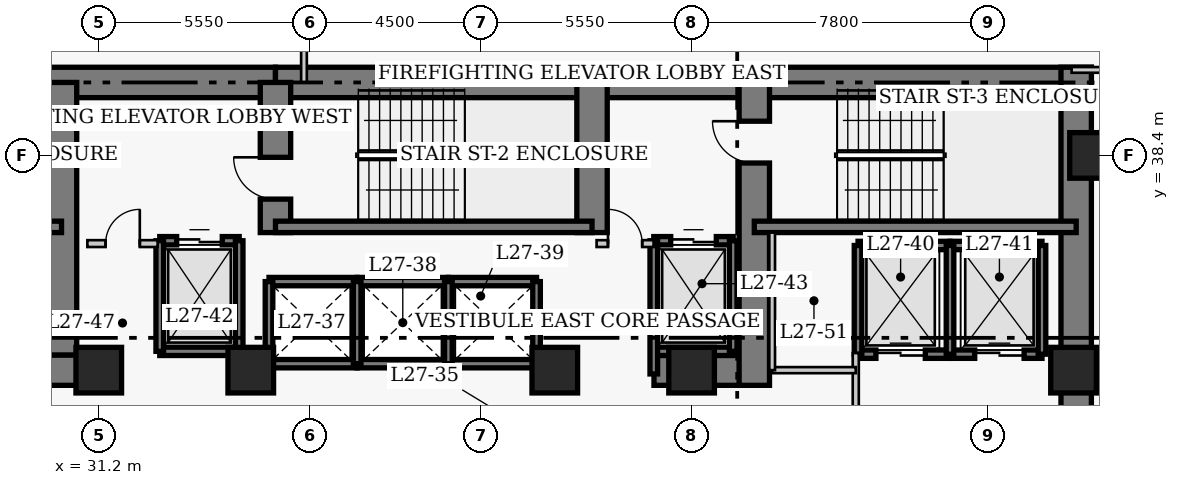
"""IFC4 building model, lengths in metres.
Left out: names, types, materials, properties, quantities, classifications, styles, units other than length and angle.
Written with IfcOpenShell. Run it as: python <this file> out.ifc"""

import sys

from ifc_helpers import new_model, si_unit, direction, frame, frame_2d, origin, origin_2d, place, context, subcontext, project, spatial, rectangle, extrude, element, fill, save


model = new_model("IFC4")
c1 = context("Model", 3, precision=1e-05, world=origin(), true_north=direction((0.0, 1.0)))
c2 = subcontext(c1, "Body", "Model", "MODEL_VIEW")
j1 = project(units=[si_unit("LENGTHUNIT", "METRE"), si_unit("PLANEANGLEUNIT", "RADIAN")], contexts=[c1])
p1 = place(None, origin())
s1 = spatial("IfcSite", under=j1, at=p1, CompositionType="ELEMENT")
p2 = place(p1, origin())
s2 = spatial("IfcBuilding", under=s1, at=p2, CompositionType="ELEMENT")
p3 = place(p2, frame((0.0, 0.0, 110.8)))
s3 = spatial("IfcBuildingStorey", under=s2, at=p3, CompositionType="ELEMENT", Elevation=110.8)
p4 = place(p3, frame((21.5, 40.32, 0.0), z_axis=(0.0, 0.0, 1.0), x_axis=(1.0, 0.0, 0.0)))
e1 = element("IfcWall", 1, at=p4, inside=s3, PredefinedType="SHEAR", context=c2, shape_type="SweptSolid", body=[
    extrude(rectangle(XDim=14.35, YDim=0.8, at=frame_2d((7.175, 0.0))), origin(), (0.0, 0.0, 1.0), 3.8),
])
p5 = place(p3, frame((35.85, 40.32, 0.0), z_axis=(0.0, 0.0, 1.0), x_axis=(1.0, 0.0, 0.0)))
e2 = element("IfcWall", 2, at=p5, inside=s3, PredefinedType="SHEAR", context=c2, shape_type="SweptSolid", body=[
    extrude(rectangle(XDim=12.6, YDim=0.8, at=frame_2d((6.3, 0.0))), origin(), (0.0, 0.0, 1.0), 3.8),
])
p6 = place(p3, frame((48.45, 40.32, 0.0), z_axis=(0.0, 0.0, 1.0), x_axis=(1.0, 0.0, 0.0)))
e3 = element("IfcWall", 3, at=p6, inside=s3, PredefinedType="SHEAR", context=c2, shape_type="SweptSolid", body=[
    extrude(rectangle(XDim=8.87, YDim=0.8, at=frame_2d((4.435, 0.0))), origin(), (0.0, 0.0, 1.0), 3.8),
])
p7 = place(p3, frame((56.92, 27.05, 0.0), z_axis=(0.0, 0.0, 1.0), x_axis=(0.0, 1.0, 0.0)))
e4 = element("IfcWall", 4, at=p7, inside=s3, PredefinedType="SHEAR", context=c2, shape_type="SweptSolid", body=[
    extrude(rectangle(XDim=13.67, YDim=0.8, at=frame_2d((6.835, 0.0))), origin(), (0.0, 0.0, 1.0), 3.8),
])
p8 = place(p3, frame((28.45, 32.75, 0.0), z_axis=(0.0, 0.0, 1.0), x_axis=(1.0, 0.0, 0.0)))
e5 = element("IfcWall", 5, at=p8, inside=s3, PredefinedType="SHEAR", context=c2, shape_type="SweptSolid", body=[
    extrude(rectangle(XDim=2.4, YDim=0.8, at=frame_2d((1.2, 0.0))), origin(), (0.0, 0.0, 1.0), 3.8),
])
p9 = place(p3, frame((45.81, 32.75, 0.0), z_axis=(0.0, 0.0, 1.0), x_axis=(1.0, 0.0, 0.0)))
e6 = element("IfcWall", 6, at=p9, inside=s3, PredefinedType="SHEAR", context=c2, shape_type="SweptSolid", body=[
    extrude(rectangle(XDim=2.64, YDim=0.8, at=frame_2d((1.32, 0.0))), origin(), (0.0, 0.0, 1.0), 3.8),
])
p10 = place(p3, frame((30.22, 33.15, 0.0), z_axis=(0.0, 0.0, 1.0), x_axis=(0.0, 1.0, 0.0)))
e7 = element("IfcWall", 7, at=p10, inside=s3, PredefinedType="SHEAR", context=c2, shape_type="SweptSolid", body=[
    extrude(rectangle(XDim=7.17, YDim=0.8, at=frame_2d((3.585, 0.0))), origin(), (0.0, 0.0, 1.0), 3.8),
])
p11 = place(p3, frame((35.85, 36.37, 0.0), z_axis=(0.0, 0.0, 1.0), x_axis=(0.0, 1.0, 0.0)))
e8 = element("IfcWall", 8, at=p11, inside=s3, PredefinedType="SHEAR", context=c2, shape_type="SweptSolid", body=[
    extrude(rectangle(XDim=3.95, YDim=0.8, at=frame_2d((1.975, 0.0))), origin(), (0.0, 0.0, 1.0), 3.8),
])
p12 = place(p11, frame((0.88, 0.0, 0.0)))
e9 = element("IfcOpeningElement", 9, at=p12, cuts=e8, PredefinedType="OPENING", context=c2, shape_type="SweptSolid", body=[
    extrude(rectangle(XDim=1.1, YDim=2.15, at=frame_2d((0.55, 1.075))), frame((0.0, 0.41, 0.0), z_axis=(0.0, -1.0, 0.0), x_axis=(1.0, 0.0, 0.0)), (0.0, 0.0, 1.0), 0.82),
])
p13 = place(p3, frame((44.18, 36.37, 0.0), z_axis=(0.0, 0.0, 1.0), x_axis=(0.0, 1.0, 0.0)))
e10 = element("IfcWall", 10, at=p13, inside=s3, PredefinedType="SHEAR", context=c2, shape_type="SweptSolid", body=[
    extrude(rectangle(XDim=3.95, YDim=0.8, at=frame_2d((1.975, 0.0))), origin(), (0.0, 0.0, 1.0), 3.8),
])
p14 = place(p3, frame((48.45, 32.35, 0.0), z_axis=(0.0, 0.0, 1.0), x_axis=(0.0, 1.0, 0.0)))
e11 = element("IfcWall", 11, at=p14, inside=s3, PredefinedType="SHEAR", context=c2, shape_type="SweptSolid", body=[
    extrude(rectangle(XDim=7.97, YDim=0.8, at=frame_2d((3.985, 0.0))), origin(), (0.0, 0.0, 1.0), 3.8),
])
p15 = place(p14, frame((5.85, 0.0, 0.0)))
e12 = element("IfcOpeningElement", 12, at=p15, cuts=e11, PredefinedType="OPENING", context=c2, shape_type="SweptSolid", body=[
    extrude(rectangle(XDim=1.1, YDim=2.15, at=frame_2d((0.55, 1.075))), frame((0.0, 0.41, 0.0), z_axis=(0.0, -1.0, 0.0), x_axis=(1.0, 0.0, 0.0)), (0.0, 0.0, 1.0), 0.82),
])
p16 = place(p3, frame((21.9, 36.52, 0.0), z_axis=(0.0, 0.0, 1.0), x_axis=(1.0, 0.0, 0.0)))
e13 = element("IfcWall", 13, at=p16, inside=s3, PredefinedType="SHEAR", context=c2, shape_type="SweptSolid", body=[
    extrude(rectangle(XDim=8.32, YDim=0.3, at=frame_2d((4.16, 0.0))), origin(), (0.0, 0.0, 1.0), 3.8),
])
p17 = place(p16, frame((0.9, 0.0, 0.0)))
e14 = element("IfcOpeningElement", 14, at=p17, cuts=e13, PredefinedType="OPENING", context=c2, shape_type="SweptSolid", body=[
    extrude(rectangle(XDim=1.1, YDim=2.15, at=frame_2d((0.55, 1.075))), frame((0.0, 0.16, 0.0), z_axis=(0.0, -1.0, 0.0), x_axis=(1.0, 0.0, 0.0)), (0.0, 0.0, 1.0), 0.32),
])
p18 = place(p3, frame((35.85, 36.52, 0.0), z_axis=(0.0, 0.0, 1.0), x_axis=(1.0, 0.0, 0.0)))
e15 = element("IfcWall", 15, at=p18, inside=s3, PredefinedType="SHEAR", context=c2, shape_type="SweptSolid", body=[
    extrude(rectangle(XDim=8.33, YDim=0.3, at=frame_2d((4.165, 0.0))), origin(), (0.0, 0.0, 1.0), 3.8),
])
p19 = place(p3, frame((48.45, 36.52, 0.0), z_axis=(0.0, 0.0, 1.0), x_axis=(1.0, 0.0, 0.0)))
e16 = element("IfcWall", 16, at=p19, inside=s3, PredefinedType="SHEAR", context=c2, shape_type="SweptSolid", body=[
    extrude(rectangle(XDim=8.47, YDim=0.3, at=frame_2d((4.235, 0.0))), origin(), (0.0, 0.0, 1.0), 3.8),
])
for number, where, z_axis, x_axis in (
    (17, (57.35, 38.4, 0.0), (0.0, 0.0, 1.0), (1.0, 0.0, 0.0)),
    (18, (31.2, 32.75, 0.0), (0.0, 0.0, 1.0), (1.0, 0.0, 0.0)),
    (19, (35.2, 32.75, 0.0), (0.0, 0.0, 1.0), (1.0, 0.0, 0.0)),
    (20, (43.2, 32.75, 0.0), (0.0, 0.0, 1.0), (1.0, 0.0, 0.0)),
    (21, (46.8, 32.75, 0.0), (0.0, 0.0, 1.0), (1.0, 0.0, 0.0)),
    (22, (56.85, 32.75, 0.0), (0.0, 0.0, 1.0), (1.0, 0.0, 0.0)),
):
    element("IfcColumn", number, at=place(p3, frame(where, z_axis=z_axis, x_axis=x_axis)), inside=s3, PredefinedType="COLUMN", context=c2, shape_type="SweptSolid", body=[
        extrude(rectangle(XDim=1.2, YDim=1.2, at=origin_2d()), origin(), (0.0, 0.0, 1.0), 3.8),
    ])
for number, where, z_axis, x_axis in (
    (23, (35.68, 35.08, 0.0), (0.0, 0.0, 1.0), (1.0, 0.0, 0.0)),
    (24, (35.68, 32.92, 0.0), (0.0, 0.0, 1.0), (1.0, 0.0, 0.0)),
):
    element("IfcWall", number, at=place(p3, frame(where, z_axis=z_axis, x_axis=x_axis)), inside=s3, PredefinedType="SHEAR", context=c2, shape_type="SweptSolid", body=[
        extrude(rectangle(XDim=2.32, YDim=0.22, at=frame_2d((1.16, 0.0))), origin(), (0.0, 0.0, 1.0), 3.8),
    ])
p20 = place(p3, frame((35.68, 32.92, 0.0), z_axis=(0.0, 0.0, 1.0), x_axis=(0.0, 1.0, 0.0)))
e25 = element("IfcWall", 25, at=p20, inside=s3, PredefinedType="SHEAR", context=c2, shape_type="SweptSolid", body=[
    extrude(rectangle(XDim=2.16, YDim=0.2, at=frame_2d((1.08, 0.0))), origin(), (0.0, 0.0, 1.0), 3.8),
])
for number, where, z_axis, x_axis in (
    (26, (38.0, 35.08, 0.0), (0.0, 0.0, 1.0), (1.0, 0.0, 0.0)),
    (27, (38.0, 32.92, 0.0), (0.0, 0.0, 1.0), (1.0, 0.0, 0.0)),
):
    element("IfcWall", number, at=place(p3, frame(where, z_axis=z_axis, x_axis=x_axis)), inside=s3, PredefinedType="SHEAR", context=c2, shape_type="SweptSolid", body=[
        extrude(rectangle(XDim=2.4, YDim=0.22, at=frame_2d((1.2, 0.0))), origin(), (0.0, 0.0, 1.0), 3.8),
    ])
p21 = place(p3, frame((38.0, 32.92, 0.0), z_axis=(0.0, 0.0, 1.0), x_axis=(0.0, 1.0, 0.0)))
e28 = element("IfcWall", 28, at=p21, inside=s3, PredefinedType="SHEAR", context=c2, shape_type="SweptSolid", body=[
    extrude(rectangle(XDim=2.16, YDim=0.2, at=frame_2d((1.08, 0.0))), origin(), (0.0, 0.0, 1.0), 3.8),
])
for number, where, z_axis, x_axis in (
    (29, (40.4, 35.08, 0.0), (0.0, 0.0, 1.0), (1.0, 0.0, 0.0)),
    (30, (40.4, 32.92, 0.0), (0.0, 0.0, 1.0), (1.0, 0.0, 0.0)),
):
    element("IfcWall", number, at=place(p3, frame(where, z_axis=z_axis, x_axis=x_axis)), inside=s3, PredefinedType="SHEAR", context=c2, shape_type="SweptSolid", body=[
        extrude(rectangle(XDim=2.32, YDim=0.22, at=frame_2d((1.16, 0.0))), origin(), (0.0, 0.0, 1.0), 3.8),
    ])
for number, where, z_axis, x_axis in (
    (31, (40.4, 32.92, 0.0), (0.0, 0.0, 1.0), (0.0, 1.0, 0.0)),
    (32, (42.72, 32.92, 0.0), (0.0, 0.0, 1.0), (0.0, 1.0, 0.0)),
):
    element("IfcWall", number, at=place(p3, frame(where, z_axis=z_axis, x_axis=x_axis)), inside=s3, PredefinedType="SHEAR", context=c2, shape_type="SweptSolid", body=[
        extrude(rectangle(XDim=2.16, YDim=0.2, at=frame_2d((1.08, 0.0))), origin(), (0.0, 0.0, 1.0), 3.8),
    ])
p22 = place(p3, frame((51.18, 36.03, 0.0), z_axis=(0.0, 0.0, 1.0), x_axis=(1.0, 0.0, 0.0)))
e33 = element("IfcWall", 33, at=p22, inside=s3, PredefinedType="SHEAR", context=c2, shape_type="SweptSolid", body=[
    extrude(rectangle(XDim=2.42, YDim=0.22, at=frame_2d((1.21, 0.0))), origin(), (0.0, 0.0, 1.0), 3.8),
])
p23 = place(p3, frame((51.18, 33.17, 0.0), z_axis=(0.0, 0.0, 1.0), x_axis=(1.0, 0.0, 0.0)))
e34 = element("IfcWall", 34, at=p23, inside=s3, PredefinedType="SHEAR", context=c2, shape_type="SweptSolid", body=[
    extrude(rectangle(XDim=2.42, YDim=0.22, at=frame_2d((1.21, 0.0))), origin(), (0.0, 0.0, 1.0), 3.8),
])
p24 = place(p23, frame((0.47, 0.0, 0.0)))
e35 = element("IfcOpeningElement", 35, at=p24, cuts=e34, PredefinedType="OPENING", context=c2, shape_type="SweptSolid", body=[
    extrude(rectangle(XDim=1.3, YDim=2.15, at=frame_2d((0.65, 1.075))), frame((0.0, 0.12, 0.0), z_axis=(0.0, -1.0, 0.0), x_axis=(1.0, 0.0, 0.0)), (0.0, 0.0, 1.0), 0.24),
])
p25 = place(p3, frame((51.18, 33.17, 0.0), z_axis=(0.0, 0.0, 1.0), x_axis=(0.0, 1.0, 0.0)))
e36 = element("IfcWall", 36, at=p25, inside=s3, PredefinedType="SHEAR", context=c2, shape_type="SweptSolid", body=[
    extrude(rectangle(XDim=2.86, YDim=0.2, at=frame_2d((1.43, 0.0))), origin(), (0.0, 0.0, 1.0), 3.8),
])
p26 = place(p3, frame((53.6, 36.03, 0.0), z_axis=(0.0, 0.0, 1.0), x_axis=(1.0, 0.0, 0.0)))
e37 = element("IfcWall", 37, at=p26, inside=s3, PredefinedType="SHEAR", context=c2, shape_type="SweptSolid", body=[
    extrude(rectangle(XDim=2.42, YDim=0.22, at=frame_2d((1.21, 0.0))), origin(), (0.0, 0.0, 1.0), 3.8),
])
p27 = place(p3, frame((53.6, 33.17, 0.0), z_axis=(0.0, 0.0, 1.0), x_axis=(1.0, 0.0, 0.0)))
e38 = element("IfcWall", 38, at=p27, inside=s3, PredefinedType="SHEAR", context=c2, shape_type="SweptSolid", body=[
    extrude(rectangle(XDim=2.42, YDim=0.22, at=frame_2d((1.21, 0.0))), origin(), (0.0, 0.0, 1.0), 3.8),
])
p28 = place(p27, frame((0.65, 0.0, 0.0)))
e39 = element("IfcOpeningElement", 39, at=p28, cuts=e38, PredefinedType="OPENING", context=c2, shape_type="SweptSolid", body=[
    extrude(rectangle(XDim=1.3, YDim=2.15, at=frame_2d((0.65, 1.075))), frame((0.0, 0.12, 0.0), z_axis=(0.0, -1.0, 0.0), x_axis=(1.0, 0.0, 0.0)), (0.0, 0.0, 1.0), 0.24),
])
for number, where, z_axis, x_axis in (
    (40, (53.6, 33.17, 0.0), (0.0, 0.0, 1.0), (0.0, 1.0, 0.0)),
    (41, (56.02, 33.17, 0.0), (0.0, 0.0, 1.0), (0.0, 1.0, 0.0)),
):
    element("IfcWall", number, at=place(p3, frame(where, z_axis=z_axis, x_axis=x_axis)), inside=s3, PredefinedType="SHEAR", context=c2, shape_type="SweptSolid", body=[
        extrude(rectangle(XDim=2.86, YDim=0.2, at=frame_2d((1.43, 0.0))), origin(), (0.0, 0.0, 1.0), 3.8),
    ])
p29 = place(p3, frame((32.805, 36.155, 0.0), z_axis=(0.0, 0.0, 1.0), x_axis=(1.0, 0.0, 0.0)))
e42 = element("IfcWall", 42, at=p29, inside=s3, PredefinedType="SHEAR", context=c2, shape_type="SweptSolid", body=[
    extrude(rectangle(XDim=2.09, YDim=0.22, at=frame_2d((1.045, 0.0))), origin(), (0.0, 0.0, 1.0), 3.8),
])
p30 = place(p29, frame((0.445, 0.0, 0.0)))
e43 = element("IfcOpeningElement", 43, at=p30, cuts=e42, PredefinedType="OPENING", context=c2, shape_type="SweptSolid", body=[
    extrude(rectangle(XDim=1.2, YDim=2.15, at=frame_2d((0.6, 1.075))), frame((0.0, 0.12, 0.0), z_axis=(0.0, -1.0, 0.0), x_axis=(1.0, 0.0, 0.0)), (0.0, 0.0, 1.0), 0.24),
])
p31 = place(p3, frame((32.805, 33.245, 0.0), z_axis=(0.0, 0.0, 1.0), x_axis=(1.0, 0.0, 0.0)))
e44 = element("IfcWall", 44, at=p31, inside=s3, PredefinedType="SHEAR", context=c2, shape_type="SweptSolid", body=[
    extrude(rectangle(XDim=2.09, YDim=0.22, at=frame_2d((1.045, 0.0))), origin(), (0.0, 0.0, 1.0), 3.8),
])
for number, where, z_axis, x_axis in (
    (45, (32.805, 33.245, 0.0), (0.0, 0.0, 1.0), (0.0, 1.0, 0.0)),
    (46, (34.895, 33.245, 0.0), (0.0, 0.0, 1.0), (0.0, 1.0, 0.0)),
):
    element("IfcWall", number, at=place(p3, frame(where, z_axis=z_axis, x_axis=x_axis)), inside=s3, PredefinedType="SHEAR", context=c2, shape_type="SweptSolid", body=[
        extrude(rectangle(XDim=2.91, YDim=0.2, at=frame_2d((1.455, 0.0))), origin(), (0.0, 0.0, 1.0), 3.8),
    ])
p32 = place(p3, frame((45.805, 36.155, 0.0), z_axis=(0.0, 0.0, 1.0), x_axis=(1.0, 0.0, 0.0)))
e47 = element("IfcWall", 47, at=p32, inside=s3, PredefinedType="SHEAR", context=c2, shape_type="SweptSolid", body=[
    extrude(rectangle(XDim=2.09, YDim=0.22, at=frame_2d((1.045, 0.0))), origin(), (0.0, 0.0, 1.0), 3.8),
])
p33 = place(p32, frame((0.445, 0.0, 0.0)))
e48 = element("IfcOpeningElement", 48, at=p33, cuts=e47, PredefinedType="OPENING", context=c2, shape_type="SweptSolid", body=[
    extrude(rectangle(XDim=1.2, YDim=2.15, at=frame_2d((0.6, 1.075))), frame((0.0, 0.12, 0.0), z_axis=(0.0, -1.0, 0.0), x_axis=(1.0, 0.0, 0.0)), (0.0, 0.0, 1.0), 0.24),
])
p34 = place(p3, frame((45.805, 33.245, 0.0), z_axis=(0.0, 0.0, 1.0), x_axis=(1.0, 0.0, 0.0)))
e49 = element("IfcWall", 49, at=p34, inside=s3, PredefinedType="SHEAR", context=c2, shape_type="SweptSolid", body=[
    extrude(rectangle(XDim=2.09, YDim=0.22, at=frame_2d((1.045, 0.0))), origin(), (0.0, 0.0, 1.0), 3.8),
])
p35 = place(p3, frame((45.805, 32.65, 0.0), z_axis=(0.0, 0.0, 1.0), x_axis=(0.0, 1.0, 0.0)))
e50 = element("IfcWall", 50, at=p35, inside=s3, PredefinedType="SHEAR", context=c2, shape_type="SweptSolid", body=[
    extrude(rectangle(XDim=3.505, YDim=0.2, at=frame_2d((1.752, 0.0))), origin(), (0.0, 0.0, 1.0), 3.8),
])
p36 = place(p3, frame((47.895, 33.245, 0.0), z_axis=(0.0, 0.0, 1.0), x_axis=(0.0, 1.0, 0.0)))
e51 = element("IfcWall", 51, at=p36, inside=s3, PredefinedType="SHEAR", context=c2, shape_type="SweptSolid", body=[
    extrude(rectangle(XDim=2.91, YDim=0.2, at=frame_2d((1.455, 0.0))), origin(), (0.0, 0.0, 1.0), 3.8),
])
p37 = place(p3, frame((30.9, 36.08, 0.0), z_axis=(0.0, 0.0, 1.0), x_axis=(1.0, 0.0, 0.0)))
e52 = element("IfcWall", 52, at=p37, inside=s3, PredefinedType="PARTITIONING", context=c2, shape_type="SweptSolid", body=[
    extrude(rectangle(XDim=1.85, YDim=0.18, at=frame_2d((0.925, 0.0))), origin(), (0.0, 0.0, 1.0), 3.54),
])
p38 = place(p37, frame((0.48, 0.0, 0.0)))
e53 = element("IfcOpeningElement", 53, at=p38, cuts=e52, PredefinedType="OPENING", context=c2, shape_type="SweptSolid", body=[
    extrude(rectangle(XDim=0.9, YDim=2.15, at=frame_2d((0.45, 1.075))), frame((0.0, 0.1, 0.0), z_axis=(0.0, -1.0, 0.0), x_axis=(1.0, 0.0, 0.0)), (0.0, 0.0, 1.0), 0.2),
])
p39 = place(p3, frame((44.3, 36.08, 0.0), z_axis=(0.0, 0.0, 1.0), x_axis=(1.0, 0.0, 0.0)))
e54 = element("IfcWall", 54, at=p39, inside=s3, PredefinedType="PARTITIONING", context=c2, shape_type="SweptSolid", body=[
    extrude(rectangle(XDim=1.5, YDim=0.18, at=frame_2d((0.75, 0.0))), origin(), (0.0, 0.0, 1.0), 3.54),
])
p40 = place(p39, frame((0.3, 0.0, 0.0)))
e55 = element("IfcOpeningElement", 55, at=p40, cuts=e54, PredefinedType="OPENING", context=c2, shape_type="SweptSolid", body=[
    extrude(rectangle(XDim=0.9, YDim=2.15, at=frame_2d((0.45, 1.075))), frame((0.0, 0.1, 0.0), z_axis=(0.0, -1.0, 0.0), x_axis=(1.0, 0.0, 0.0)), (0.0, 0.0, 1.0), 0.2),
])
p41 = place(p3, frame((51.12, 29.5, 0.0), z_axis=(0.0, 0.0, 1.0), x_axis=(0.0, 1.0, 0.0)))
e56 = element("IfcWall", 56, at=p41, inside=s3, PredefinedType="PARTITIONING", context=c2, shape_type="SweptSolid", body=[
    extrude(rectangle(XDim=3.7, YDim=0.16, at=frame_2d((1.85, 0.0))), origin(), (0.0, 0.0, 1.0), 3.54),
])
p42 = place(p41, frame((0.9, 0.0, 0.0)))
e57 = element("IfcOpeningElement", 57, at=p42, cuts=e56, PredefinedType="OPENING", context=c2, shape_type="SweptSolid", body=[
    extrude(rectangle(XDim=1.1, YDim=2.15, at=frame_2d((0.55, 1.075))), frame((0.0, 0.09, 0.0), z_axis=(0.0, -1.0, 0.0), x_axis=(1.0, 0.0, 0.0)), (0.0, 0.0, 1.0), 0.18),
])
p43 = place(p3, frame((48.92, 32.75, 0.0), z_axis=(0.0, 0.0, 1.0), x_axis=(1.0, 0.0, 0.0)))
e58 = element("IfcWall", 58, at=p43, inside=s3, PredefinedType="PARTITIONING", context=c2, shape_type="SweptSolid", body=[
    extrude(rectangle(XDim=2.2, YDim=0.16, at=frame_2d((1.1, 0.0))), origin(), (0.0, 0.0, 1.0), 3.54),
])
p44 = place(p3, frame((48.92, 32.75, 0.0), z_axis=(0.0, 0.0, 1.0), x_axis=(0.0, 1.0, 0.0)))
e59 = element("IfcWall", 59, at=p44, inside=s3, PredefinedType="PARTITIONING", context=c2, shape_type="SweptSolid", body=[
    extrude(rectangle(XDim=3.62, YDim=0.15, at=frame_2d((1.81, 0.0))), origin(), (0.0, 0.0, 1.0), 3.54),
])
p45 = place(p3, frame((56.8, 40.65, 0.0), z_axis=(0.0, 0.0, 1.0), x_axis=(1.0, 0.0, 0.0)))
e60 = element("IfcWall", 60, at=p45, inside=s3, PredefinedType="PARTITIONING", context=c2, shape_type="SweptSolid", body=[
    extrude(rectangle(XDim=3.66, YDim=0.15, at=frame_2d((1.83, 0.0))), origin(), (0.0, 0.0, 1.0), 3.54),
])
p46 = place(p45, frame((2.05, 0.0, 0.0)))
e61 = element("IfcOpeningElement", 61, at=p46, cuts=e60, PredefinedType="OPENING", context=c2, shape_type="SweptSolid", body=[
    extrude(rectangle(XDim=1.0, YDim=2.15, at=frame_2d((0.5, 1.075))), frame((0.0, 0.085, 0.0), z_axis=(0.0, -1.0, 0.0), x_axis=(1.0, 0.0, 0.0)), (0.0, 0.0, 1.0), 0.17),
])
p47 = place(p3, frame((36.6, 40.32, 0.0), z_axis=(0.0, 0.0, 1.0), x_axis=(0.0, 1.0, 0.0)))
e62 = element("IfcWall", 62, at=p47, inside=s3, PredefinedType="PARTITIONING", context=c2, shape_type="SweptSolid", body=[
    extrude(rectangle(XDim=3.445, YDim=0.15, at=frame_2d((1.723, 0.0))), origin(), (0.0, 0.0, 1.0), 3.54),
])
p48 = place(p24, origin())
e63 = element("IfcDoor", 63, at=p48, inside=s3, OperationType="DOUBLE_DOOR_SLIDING", PredefinedType="DOOR", context=c2, shape_type="SweptSolid", body=[
    extrude(rectangle(XDim=1.3, YDim=2.15, at=frame_2d((0.65, 1.075))), frame((0.0, 0.025, 0.0), z_axis=(0.0, -1.0, 0.0), x_axis=(1.0, 0.0, 0.0)), (0.0, 0.0, 1.0), 0.05),
])
fill(e35, e63)
p49 = place(p28, origin())
e64 = element("IfcDoor", 64, at=p49, inside=s3, OperationType="DOUBLE_DOOR_SLIDING", PredefinedType="DOOR", context=c2, shape_type="SweptSolid", body=[
    extrude(rectangle(XDim=1.3, YDim=2.15, at=frame_2d((0.65, 1.075))), frame((0.0, 0.025, 0.0), z_axis=(0.0, -1.0, 0.0), x_axis=(1.0, 0.0, 0.0)), (0.0, 0.0, 1.0), 0.05),
])
fill(e39, e64)
p50 = place(p30, origin())
e65 = element("IfcDoor", 65, at=p50, inside=s3, OperationType="DOUBLE_DOOR_SLIDING", PredefinedType="DOOR", context=c2, shape_type="SweptSolid", body=[
    extrude(rectangle(XDim=1.2, YDim=2.15, at=frame_2d((0.6, 1.075))), frame((0.0, 0.025, 0.0), z_axis=(0.0, -1.0, 0.0), x_axis=(1.0, 0.0, 0.0)), (0.0, 0.0, 1.0), 0.05),
])
fill(e43, e65)
p51 = place(p33, origin())
e66 = element("IfcDoor", 66, at=p51, inside=s3, OperationType="DOUBLE_DOOR_SLIDING", PredefinedType="DOOR", context=c2, shape_type="SweptSolid", body=[
    extrude(rectangle(XDim=1.2, YDim=2.15, at=frame_2d((0.6, 1.075))), frame((0.0, 0.025, 0.0), z_axis=(0.0, -1.0, 0.0), x_axis=(1.0, 0.0, 0.0)), (0.0, 0.0, 1.0), 0.05),
])
fill(e48, e66)
p52 = place(p38, origin())
e67 = element("IfcDoor", 67, at=p52, inside=s3, OperationType="SINGLE_SWING_RIGHT", PredefinedType="DOOR", context=c2, shape_type="SweptSolid", body=[
    extrude(rectangle(XDim=0.9, YDim=2.15, at=frame_2d((0.45, 1.075))), frame((0.0, 0.025, 0.0), z_axis=(0.0, -1.0, 0.0), x_axis=(1.0, 0.0, 0.0)), (0.0, 0.0, 1.0), 0.05),
])
fill(e53, e67)
p53 = place(p40, origin())
e68 = element("IfcDoor", 68, at=p53, inside=s3, OperationType="SINGLE_SWING_LEFT", PredefinedType="DOOR", context=c2, shape_type="SweptSolid", body=[
    extrude(rectangle(XDim=0.9, YDim=2.15, at=frame_2d((0.45, 1.075))), frame((0.0, 0.025, 0.0), z_axis=(0.0, -1.0, 0.0), x_axis=(1.0, 0.0, 0.0)), (0.0, 0.0, 1.0), 0.05),
])
fill(e55, e68)
p54 = place(p12, origin())
e69 = element("IfcDoor", 69, at=p54, inside=s3, OperationType="SINGLE_SWING_RIGHT", PredefinedType="DOOR", context=c2, shape_type="SweptSolid", body=[
    extrude(rectangle(XDim=1.1, YDim=2.15, at=frame_2d((0.55, 1.075))), frame((0.0, 0.025, 0.0), z_axis=(0.0, -1.0, 0.0), x_axis=(1.0, 0.0, 0.0)), (0.0, 0.0, 1.0), 0.05),
])
fill(e9, e69)
p55 = place(p15, origin())
e70 = element("IfcDoor", 70, at=p55, inside=s3, OperationType="SINGLE_SWING_RIGHT", PredefinedType="DOOR", context=c2, shape_type="SweptSolid", body=[
    extrude(rectangle(XDim=1.1, YDim=2.15, at=frame_2d((0.55, 1.075))), frame((0.0, 0.025, 0.0), z_axis=(0.0, -1.0, 0.0), x_axis=(1.0, 0.0, 0.0)), (0.0, 0.0, 1.0), 0.05),
])
fill(e12, e70)
save(model, sys.argv[1])
